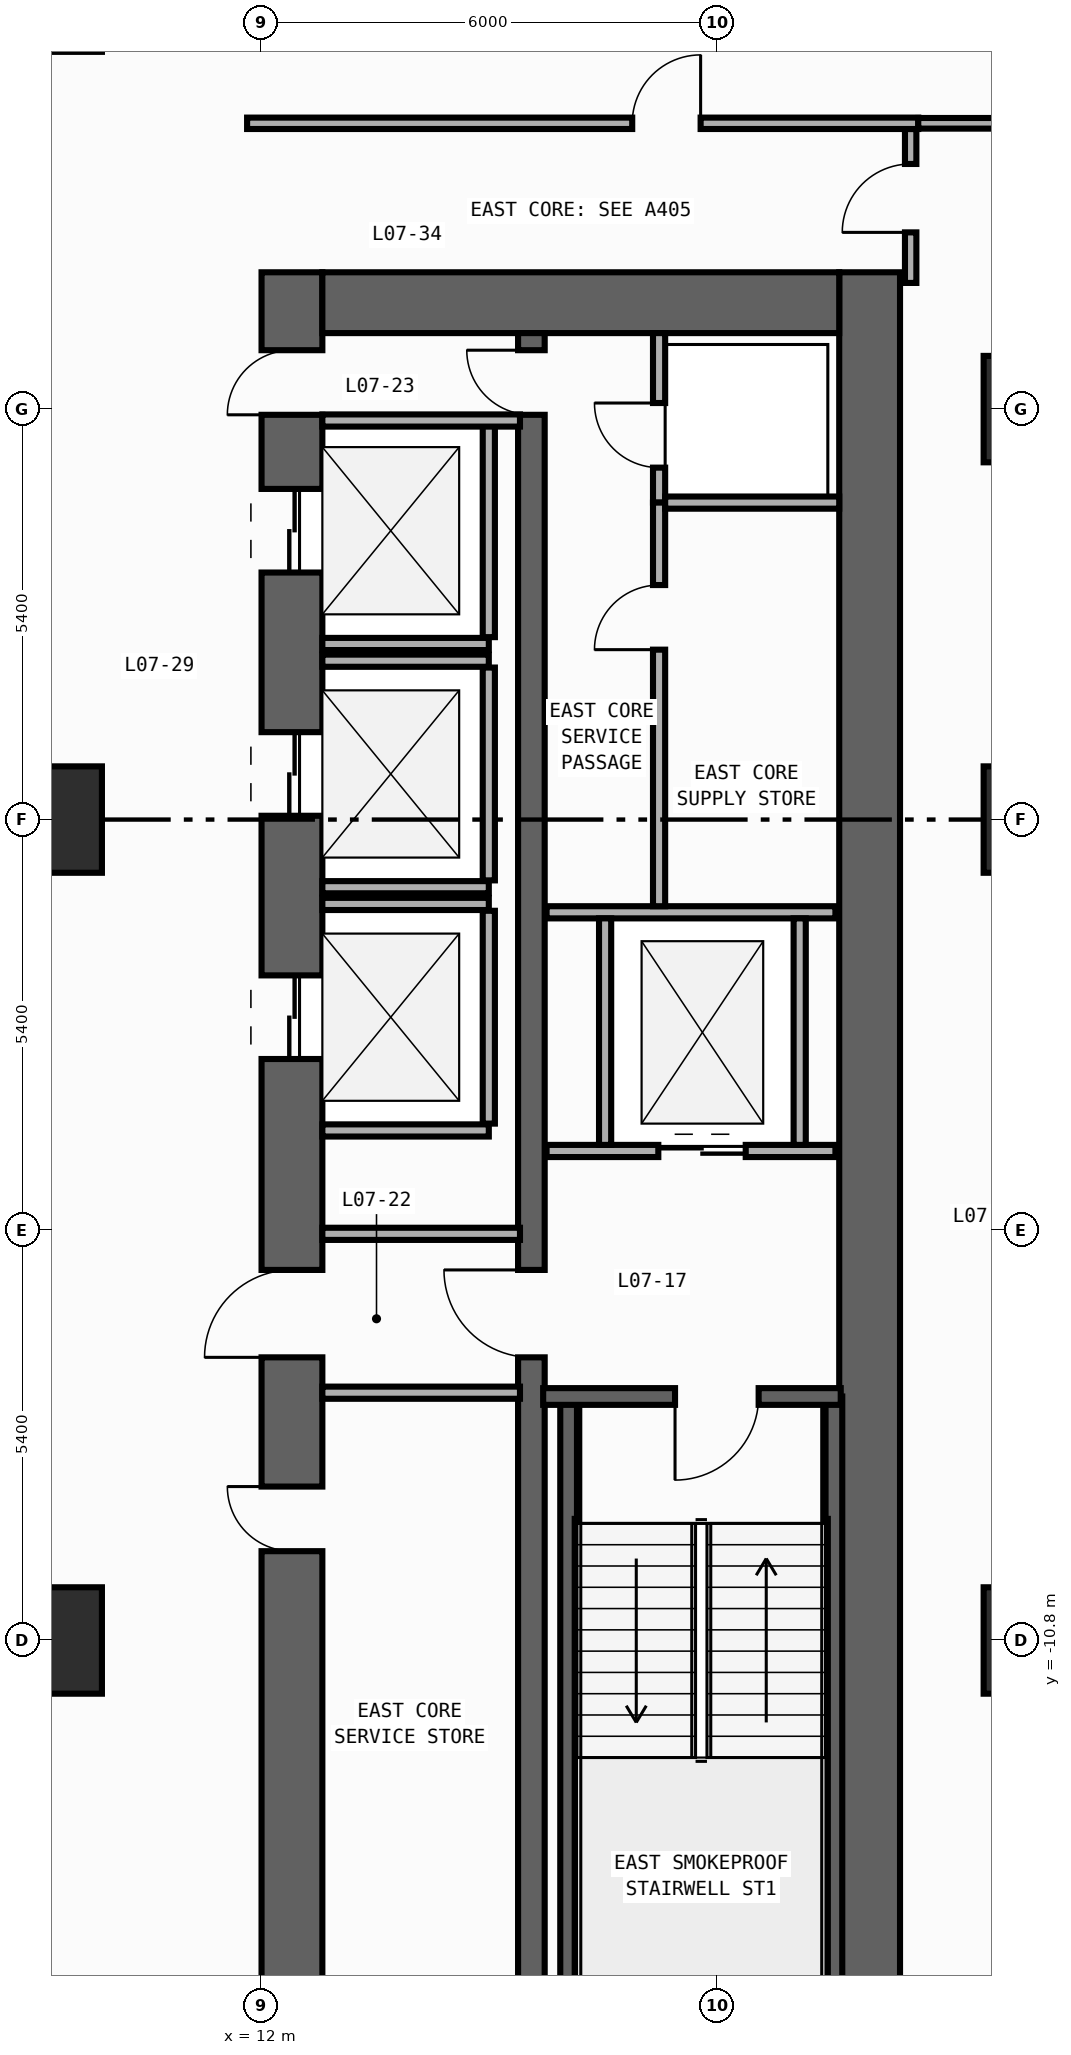
"""IFC4 building model, lengths in metres.
Left out: names, types, materials, properties, quantities, classifications, styles, units other than length and angle.
Written with IfcOpenShell. Run it as: python <this file> out.ifc"""

import sys

from ifc_helpers import new_model, si_unit, direction, frame, frame_2d, origin, origin_2d, place, context, subcontext, project, spatial, rectangle, extrude, element, fill, save


model = new_model("IFC4")
c1 = context("Model", 3, precision=1e-05, world=origin(), true_north=direction((0.0, 1.0)))
c2 = subcontext(c1, "Body", "Model", "MODEL_VIEW")
j1 = project(units=[si_unit("LENGTHUNIT", "METRE"), si_unit("PLANEANGLEUNIT", "RADIAN")], contexts=[c1])
p1 = place(None, origin())
s1 = spatial("IfcSite", under=j1, at=p1, CompositionType="ELEMENT")
p2 = place(p1, origin())
s2 = spatial("IfcBuilding", under=s1, at=p2, CompositionType="ELEMENT")
p3 = place(p2, frame((0.0, 0.0, 30.2)))
s3 = spatial("IfcBuildingStorey", under=s2, at=p3, CompositionType="ELEMENT", Elevation=30.2)
p4 = place(p3, frame((12.4, -19.8, 0.0), z_axis=(0.0, 0.0, 1.0), x_axis=(0.0, 1.0, 0.0)))
e1 = element("IfcWall", 1, at=p4, inside=s3, PredefinedType="SHEAR", context=c2, shape_type="SweptSolid", body=[
    extrude(rectangle(XDim=27.0, YDim=0.8, at=frame_2d((13.5, 0.0))), origin(), (0.0, 0.0, 1.0), 3.94),
])
p5 = place(p4, frame((23.05, 0.0, 0.0)))
e2 = element("IfcOpeningElement", 2, at=p5, cuts=e1, PredefinedType="OPENING", context=c2, shape_type="SweptSolid", body=[
    extrude(rectangle(XDim=1.1, YDim=2.2, at=frame_2d((0.55, 1.1))), frame((0.0, 0.41, 0.0), z_axis=(0.0, -1.0, 0.0), x_axis=(1.0, 0.0, 0.0)), (0.0, 0.0, 1.0), 0.82),
])
p6 = place(p4, frame((19.85, 0.0, 0.0)))
e3 = element("IfcOpeningElement", 3, at=p6, cuts=e1, PredefinedType="OPENING", context=c2, shape_type="SweptSolid", body=[
    extrude(rectangle(XDim=1.1, YDim=2.2, at=frame_2d((0.55, 1.1))), frame((0.0, 0.41, 0.0), z_axis=(0.0, -1.0, 0.0), x_axis=(1.0, 0.0, 0.0)), (0.0, 0.0, 1.0), 0.82),
])
p7 = place(p4, frame((16.65, 0.0, 0.0)))
e4 = element("IfcOpeningElement", 4, at=p7, cuts=e1, PredefinedType="OPENING", context=c2, shape_type="SweptSolid", body=[
    extrude(rectangle(XDim=1.1, YDim=2.2, at=frame_2d((0.55, 1.1))), frame((0.0, 0.41, 0.0), z_axis=(0.0, -1.0, 0.0), x_axis=(1.0, 0.0, 0.0)), (0.0, 0.0, 1.0), 0.82),
])
p8 = place(p4, frame((10.175, 0.0, 0.0)))
e5 = element("IfcOpeningElement", 5, at=p8, cuts=e1, PredefinedType="OPENING", context=c2, shape_type="SweptSolid", body=[
    extrude(rectangle(XDim=0.85, YDim=2.1, at=frame_2d((0.425, 1.05))), frame((0.0, 0.41, 0.0), z_axis=(0.0, -1.0, 0.0), x_axis=(1.0, 0.0, 0.0)), (0.0, 0.0, 1.0), 0.82),
])
p9 = place(p4, frame((12.725, 0.0, 0.0)))
e6 = element("IfcOpeningElement", 6, at=p9, cuts=e1, PredefinedType="OPENING", context=c2, shape_type="SweptSolid", body=[
    extrude(rectangle(XDim=1.15, YDim=2.2, at=frame_2d((0.575, 1.1))), frame((0.0, 0.41, 0.0), z_axis=(0.0, -1.0, 0.0), x_axis=(1.0, 0.0, 0.0)), (0.0, 0.0, 1.0), 0.82),
])
p10 = place(p4, frame((25.125, 0.0, 0.0)))
e7 = element("IfcOpeningElement", 7, at=p10, cuts=e1, PredefinedType="OPENING", context=c2, shape_type="SweptSolid", body=[
    extrude(rectangle(XDim=0.85, YDim=2.1, at=frame_2d((0.425, 1.05))), frame((0.0, 0.41, 0.0), z_axis=(0.0, -1.0, 0.0), x_axis=(1.0, 0.0, 0.0)), (0.0, 0.0, 1.0), 0.82),
])
p11 = place(p3, frame((20.0, -19.8, 0.0), z_axis=(0.0, 0.0, 1.0), x_axis=(0.0, 1.0, 0.0)))
e8 = element("IfcWall", 8, at=p11, inside=s3, PredefinedType="SHEAR", context=c2, shape_type="SweptSolid", body=[
    extrude(rectangle(XDim=27.0, YDim=0.8, at=frame_2d((13.5, 0.0))), origin(), (0.0, 0.0, 1.0), 3.94),
])
p12 = place(p3, frame((12.8, 6.8, 0.0), z_axis=(0.0, 0.0, 1.0), x_axis=(1.0, 0.0, 0.0)))
e9 = element("IfcWall", 9, at=p12, inside=s3, PredefinedType="SHEAR", context=c2, shape_type="SweptSolid", body=[
    extrude(rectangle(XDim=6.8, YDim=0.8, at=frame_2d((3.4, 0.0))), origin(), (0.0, 0.0, 1.0), 3.94),
])
p13 = place(p3, frame((15.55, -19.0, 0.0), z_axis=(0.0, 0.0, 1.0), x_axis=(0.0, 1.0, 0.0)))
e10 = element("IfcWall", 10, at=p13, inside=s3, PredefinedType="SHEAR", context=c2, shape_type="SweptSolid", body=[
    extrude(rectangle(XDim=25.4, YDim=0.35, at=frame_2d((12.7, 0.0))), origin(), (0.0, 0.0, 1.0), 3.94),
])
p14 = place(p13, frame((11.925, 0.0, 0.0)))
e11 = element("IfcOpeningElement", 11, at=p14, cuts=e10, PredefinedType="OPENING", context=c2, shape_type="SweptSolid", body=[
    extrude(rectangle(XDim=1.15, YDim=2.2, at=frame_2d((0.575, 1.1))), frame((0.0, 0.185, 0.0), z_axis=(0.0, -1.0, 0.0), x_axis=(1.0, 0.0, 0.0)), (0.0, 0.0, 1.0), 0.37),
])
p15 = place(p13, frame((24.325, 0.0, 0.0)))
e12 = element("IfcOpeningElement", 12, at=p15, cuts=e10, PredefinedType="OPENING", context=c2, shape_type="SweptSolid", body=[
    extrude(rectangle(XDim=0.85, YDim=2.1, at=frame_2d((0.425, 1.05))), frame((0.0, 0.185, 0.0), z_axis=(0.0, -1.0, 0.0), x_axis=(1.0, 0.0, 0.0)), (0.0, 0.0, 1.0), 0.37),
])
for number, where, z_axis, x_axis in (
    (13, (16.04, -18.89, 0.0), (0.0, 0.0, 1.0), (0.0, 1.0, 0.0)),
    (14, (19.53, -18.89, 0.0), (0.0, 0.0, 1.0), (0.0, 1.0, 0.0)),
):
    element("IfcWall", number, at=place(p3, frame(where, z_axis=z_axis, x_axis=x_axis)), inside=s3, PredefinedType="SHEAR", context=c2, shape_type="SweptSolid", body=[
        extrude(rectangle(XDim=11.3, YDim=0.22, at=frame_2d((5.65, 0.0))), origin(), (0.0, 0.0, 1.0), 3.94),
    ])
p16 = place(p3, frame((19.62, -7.59, 0.0), z_axis=(0.0, 0.0, 1.0), x_axis=(-1.0, 0.0, 0.0)))
e15 = element("IfcWall", 15, at=p16, inside=s3, PredefinedType="SHEAR", context=c2, shape_type="SweptSolid", body=[
    extrude(rectangle(XDim=3.915, YDim=0.22, at=frame_2d((1.958, 0.0))), origin(), (0.0, 0.0, 1.0), 3.94),
])
p17 = place(p16, frame((1.08, 0.0, 0.0)))
e16 = element("IfcOpeningElement", 16, at=p17, cuts=e15, PredefinedType="OPENING", context=c2, shape_type="SweptSolid", body=[
    extrude(rectangle(XDim=1.1, YDim=2.2, at=frame_2d((0.55, 1.1))), frame((0.0, 0.12, 0.0), z_axis=(0.0, -1.0, 0.0), x_axis=(1.0, 0.0, 0.0)), (0.0, 0.0, 1.0), 0.24),
])
for number, where, z_axis, x_axis in (
    (17, (9.2, -10.8, 0.0), (0.0, 0.0, 1.0), (1.0, 0.0, 0.0)),
    (18, (9.2, 0.0, 0.0), (0.0, 0.0, 1.0), (1.0, 0.0, 0.0)),
    (19, (22.2, -10.8, 0.0), (0.0, 0.0, 1.0), (1.0, 0.0, 0.0)),
    (20, (22.2, 0.0, 0.0), (0.0, 0.0, 1.0), (1.0, 0.0, 0.0)),
    (21, (22.2, 5.4, 0.0), (0.0, 0.0, 1.0), (1.0, 0.0, 0.0)),
):
    element("IfcColumn", number, at=place(p3, frame(where, z_axis=z_axis, x_axis=x_axis)), inside=s3, PredefinedType="COLUMN", context=c2, shape_type="SweptSolid", body=[
        extrude(rectangle(XDim=1.4, YDim=1.4, at=origin_2d()), origin(), (0.0, 0.0, 1.0), 4.2),
    ])
p18 = place(p3, frame((12.8, 2.31, 0.0), z_axis=(0.0, 0.0, 1.0), x_axis=(1.0, 0.0, 0.0)))
e22 = element("IfcWall", 22, at=p18, inside=s3, PredefinedType="STANDARD", context=c2, shape_type="SweptSolid", body=[
    extrude(rectangle(XDim=2.19, YDim=0.16, at=frame_2d((1.095, 0.0))), origin(), (0.0, 0.0, 1.0), 3.94),
])
p19 = place(p3, frame((14.99, 2.4, 0.0), z_axis=(0.0, 0.0, 1.0), x_axis=(0.0, 1.0, 0.0)))
e23 = element("IfcWall", 23, at=p19, inside=s3, PredefinedType="STANDARD", context=c2, shape_type="SweptSolid", body=[
    extrude(rectangle(XDim=2.8, YDim=0.16, at=frame_2d((1.4, 0.0))), origin(), (0.0, 0.0, 1.0), 3.94),
])
for number, where, z_axis, x_axis in (
    (24, (12.8, -0.89, 0.0), (0.0, 0.0, 1.0), (1.0, 0.0, 0.0)),
    (25, (12.8, 2.09, 0.0), (0.0, 0.0, 1.0), (1.0, 0.0, 0.0)),
):
    element("IfcWall", number, at=place(p3, frame(where, z_axis=z_axis, x_axis=x_axis)), inside=s3, PredefinedType="STANDARD", context=c2, shape_type="SweptSolid", body=[
        extrude(rectangle(XDim=2.19, YDim=0.16, at=frame_2d((1.095, 0.0))), origin(), (0.0, 0.0, 1.0), 3.94),
    ])
p20 = place(p3, frame((14.99, -0.8, 0.0), z_axis=(0.0, 0.0, 1.0), x_axis=(0.0, 1.0, 0.0)))
e26 = element("IfcWall", 26, at=p20, inside=s3, PredefinedType="STANDARD", context=c2, shape_type="SweptSolid", body=[
    extrude(rectangle(XDim=2.8, YDim=0.16, at=frame_2d((1.4, 0.0))), origin(), (0.0, 0.0, 1.0), 3.94),
])
for number, where, z_axis, x_axis in (
    (27, (12.8, -4.09, 0.0), (0.0, 0.0, 1.0), (1.0, 0.0, 0.0)),
    (28, (12.8, -1.11, 0.0), (0.0, 0.0, 1.0), (1.0, 0.0, 0.0)),
):
    element("IfcWall", number, at=place(p3, frame(where, z_axis=z_axis, x_axis=x_axis)), inside=s3, PredefinedType="STANDARD", context=c2, shape_type="SweptSolid", body=[
        extrude(rectangle(XDim=2.19, YDim=0.16, at=frame_2d((1.095, 0.0))), origin(), (0.0, 0.0, 1.0), 3.94),
    ])
p21 = place(p3, frame((14.99, -4.0, 0.0), z_axis=(0.0, 0.0, 1.0), x_axis=(0.0, 1.0, 0.0)))
e29 = element("IfcWall", 29, at=p21, inside=s3, PredefinedType="STANDARD", context=c2, shape_type="SweptSolid", body=[
    extrude(rectangle(XDim=2.8, YDim=0.16, at=frame_2d((1.4, 0.0))), origin(), (0.0, 0.0, 1.0), 3.94),
])
p22 = place(p3, frame((15.75, -4.36, 0.0), z_axis=(0.0, 0.0, 1.0), x_axis=(1.0, 0.0, 0.0)))
e30 = element("IfcWall", 30, at=p22, inside=s3, PredefinedType="STANDARD", context=c2, shape_type="SweptSolid", body=[
    extrude(rectangle(XDim=3.8, YDim=0.16, at=frame_2d((1.9, 0.0))), origin(), (0.0, 0.0, 1.0), 3.94),
])
p23 = place(p22, frame((1.47, 0.0, 0.0)))
e31 = element("IfcOpeningElement", 31, at=p23, cuts=e30, PredefinedType="OPENING", context=c2, shape_type="SweptSolid", body=[
    extrude(rectangle(XDim=1.15, YDim=2.2, at=frame_2d((0.575, 1.1))), frame((0.0, 0.09, 0.0), z_axis=(0.0, -1.0, 0.0), x_axis=(1.0, 0.0, 0.0)), (0.0, 0.0, 1.0), 0.18),
])
p24 = place(p3, frame((15.75, -1.22, 0.0), z_axis=(0.0, 0.0, 1.0), x_axis=(1.0, 0.0, 0.0)))
e32 = element("IfcWall", 32, at=p24, inside=s3, PredefinedType="STANDARD", context=c2, shape_type="SweptSolid", body=[
    extrude(rectangle(XDim=3.8, YDim=0.16, at=frame_2d((1.9, 0.0))), origin(), (0.0, 0.0, 1.0), 3.94),
])
for number, where, z_axis, x_axis in (
    (33, (16.52, -4.28, 0.0), (0.0, 0.0, 1.0), (0.0, 1.0, 0.0)),
    (34, (19.08, -4.28, 0.0), (0.0, 0.0, 1.0), (0.0, 1.0, 0.0)),
):
    element("IfcWall", number, at=place(p3, frame(where, z_axis=z_axis, x_axis=x_axis)), inside=s3, PredefinedType="STANDARD", context=c2, shape_type="SweptSolid", body=[
        extrude(rectangle(XDim=2.98, YDim=0.16, at=frame_2d((1.49, 0.0))), origin(), (0.0, 0.0, 1.0), 3.94),
    ])
for number, where, z_axis, x_axis in (
    (35, (12.8, -5.45, 0.0), (0.0, 0.0, 1.0), (1.0, 0.0, 0.0)),
    (36, (12.8, -7.54, 0.0), (0.0, 0.0, 1.0), (1.0, 0.0, 0.0)),
    (37, (12.8, 5.25, 0.0), (0.0, 0.0, 1.0), (1.0, 0.0, 0.0)),
):
    element("IfcWall", number, at=place(p3, frame(where, z_axis=z_axis, x_axis=x_axis)), inside=s3, PredefinedType="STANDARD", context=c2, shape_type="SweptSolid", body=[
        extrude(rectangle(XDim=2.6, YDim=0.16, at=frame_2d((1.3, 0.0))), origin(), (0.0, 0.0, 1.0), 3.94),
    ])
p25 = place(p3, frame((17.23, 4.17, 0.0), z_axis=(0.0, 0.0, 1.0), x_axis=(0.0, 1.0, 0.0)))
e38 = element("IfcWall", 38, at=p25, inside=s3, PredefinedType="PARTITIONING", context=c2, shape_type="SweptSolid", body=[
    extrude(rectangle(XDim=2.23, YDim=0.16, at=frame_2d((1.115, 0.0))), origin(), (0.0, 0.0, 1.0), 3.94),
])
p26 = place(p25, frame((0.46, 0.0, 0.0)))
e39 = element("IfcOpeningElement", 39, at=p26, cuts=e38, PredefinedType="OPENING", context=c2, shape_type="SweptSolid", body=[
    extrude(rectangle(XDim=0.85, YDim=2.1, at=frame_2d((0.425, 1.05))), frame((0.0, 0.09, 0.0), z_axis=(0.0, -1.0, 0.0), x_axis=(1.0, 0.0, 0.0)), (0.0, 0.0, 1.0), 0.18),
])
p27 = place(p3, frame((17.23, -1.14, 0.0), z_axis=(0.0, 0.0, 1.0), x_axis=(0.0, 1.0, 0.0)))
e40 = element("IfcWall", 40, at=p27, inside=s3, PredefinedType="PARTITIONING", context=c2, shape_type="SweptSolid", body=[
    extrude(rectangle(XDim=5.31, YDim=0.16, at=frame_2d((2.655, 0.0))), origin(), (0.0, 0.0, 1.0), 3.94),
])
p28 = place(p27, frame((3.375, 0.0, 0.0)))
e41 = element("IfcOpeningElement", 41, at=p28, cuts=e40, PredefinedType="OPENING", context=c2, shape_type="SweptSolid", body=[
    extrude(rectangle(XDim=0.85, YDim=2.1, at=frame_2d((0.425, 1.05))), frame((0.0, 0.09, 0.0), z_axis=(0.0, -1.0, 0.0), x_axis=(1.0, 0.0, 0.0)), (0.0, 0.0, 1.0), 0.18),
])
p29 = place(p3, frame((17.31, 4.17, 0.0), z_axis=(0.0, 0.0, 1.0), x_axis=(1.0, 0.0, 0.0)))
e42 = element("IfcWall", 42, at=p29, inside=s3, PredefinedType="PARTITIONING", context=c2, shape_type="SweptSolid", body=[
    extrude(rectangle(XDim=2.29, YDim=0.16, at=frame_2d((1.145, 0.0))), origin(), (0.0, 0.0, 1.0), 3.94),
])
p30 = place(p3, frame((20.54, 7.06, 0.0), z_axis=(0.0, 0.0, 1.0), x_axis=(0.0, 1.0, 0.0)))
e43 = element("IfcWall", 43, at=p30, inside=s3, PredefinedType="PARTITIONING", context=c2, shape_type="SweptSolid", body=[
    extrude(rectangle(XDim=2.025, YDim=0.15, at=frame_2d((1.012, 0.0))), origin(), (0.0, 0.0, 1.0), 3.94),
])
p31 = place(p30, frame((0.665, 0.0, 0.0)))
e44 = element("IfcOpeningElement", 44, at=p31, cuts=e43, PredefinedType="OPENING", context=c2, shape_type="SweptSolid", body=[
    extrude(rectangle(XDim=0.9, YDim=2.15, at=frame_2d((0.45, 1.075))), frame((0.0, 0.085, 0.0), z_axis=(0.0, -1.0, 0.0), x_axis=(1.0, 0.0, 0.0)), (0.0, 0.0, 1.0), 0.17),
])
p32 = place(p3, frame((11.81, 9.16, 0.0), z_axis=(0.0, 0.0, 1.0), x_axis=(1.0, 0.0, 0.0)))
e45 = element("IfcWall", 45, at=p32, inside=s3, PredefinedType="PARTITIONING", context=c2, shape_type="SweptSolid", body=[
    extrude(rectangle(XDim=8.83, YDim=0.15, at=frame_2d((4.415, 0.0))), origin(), (0.0, 0.0, 1.0), 3.94),
])
p33 = place(p32, frame((5.067, 0.0, 0.0)))
e46 = element("IfcOpeningElement", 46, at=p33, cuts=e45, PredefinedType="OPENING", context=c2, shape_type="SweptSolid", body=[
    extrude(rectangle(XDim=0.9, YDim=2.15, at=frame_2d((0.45, 1.075))), frame((0.0, 0.085, 0.0), z_axis=(0.0, -1.0, 0.0), x_axis=(1.0, 0.0, 0.0)), (0.0, 0.0, 1.0), 0.17),
])
p34 = place(p3, frame((20.64, 9.16, 0.0), z_axis=(0.0, 0.0, 1.0), x_axis=(1.0, 0.0, 0.0)))
e47 = element("IfcWall", 47, at=p34, inside=s3, PredefinedType="PARTITIONING", context=c2, shape_type="SweptSolid", body=[
    extrude(rectangle(XDim=3.415, YDim=0.14, at=frame_2d((1.708, 0.0))), origin(), (0.0, 0.0, 1.0), 3.94),
])
p35 = place(p17, origin())
e48 = element("IfcDoor", 48, at=p35, inside=s3, OperationType="SINGLE_SWING_RIGHT", PredefinedType="DOOR", context=c2, shape_type="SweptSolid", body=[
    extrude(rectangle(XDim=1.1, YDim=2.2, at=frame_2d((0.55, 1.1))), frame((0.0, 0.025, 0.0), z_axis=(0.0, -1.0, 0.0), x_axis=(1.0, 0.0, 0.0)), (0.0, 0.0, 1.0), 0.05),
])
fill(e16, e48)
p36 = place(p5, origin())
e49 = element("IfcDoor", 49, at=p36, inside=s3, OperationType="DOUBLE_DOOR_SLIDING", PredefinedType="DOOR", context=c2, shape_type="SweptSolid", body=[
    extrude(rectangle(XDim=1.1, YDim=2.2, at=frame_2d((0.55, 1.1))), frame((0.0, 0.025, 0.0), z_axis=(0.0, -1.0, 0.0), x_axis=(1.0, 0.0, 0.0)), (0.0, 0.0, 1.0), 0.05),
])
fill(e2, e49)
p37 = place(p6, origin())
e50 = element("IfcDoor", 50, at=p37, inside=s3, OperationType="DOUBLE_DOOR_SLIDING", PredefinedType="DOOR", context=c2, shape_type="SweptSolid", body=[
    extrude(rectangle(XDim=1.1, YDim=2.2, at=frame_2d((0.55, 1.1))), frame((0.0, 0.025, 0.0), z_axis=(0.0, -1.0, 0.0), x_axis=(1.0, 0.0, 0.0)), (0.0, 0.0, 1.0), 0.05),
])
fill(e3, e50)
p38 = place(p7, origin())
e51 = element("IfcDoor", 51, at=p38, inside=s3, OperationType="DOUBLE_DOOR_SLIDING", PredefinedType="DOOR", context=c2, shape_type="SweptSolid", body=[
    extrude(rectangle(XDim=1.1, YDim=2.2, at=frame_2d((0.55, 1.1))), frame((0.0, 0.025, 0.0), z_axis=(0.0, -1.0, 0.0), x_axis=(1.0, 0.0, 0.0)), (0.0, 0.0, 1.0), 0.05),
])
fill(e4, e51)
p39 = place(p8, origin())
e52 = element("IfcDoor", 52, at=p39, inside=s3, OperationType="SINGLE_SWING_RIGHT", PredefinedType="DOOR", context=c2, shape_type="SweptSolid", body=[
    extrude(rectangle(XDim=0.85, YDim=2.1, at=frame_2d((0.425, 1.05))), frame((0.0, 0.025, 0.0), z_axis=(0.0, -1.0, 0.0), x_axis=(1.0, 0.0, 0.0)), (0.0, 0.0, 1.0), 0.05),
])
fill(e5, e52)
p40 = place(p9, origin())
e53 = element("IfcDoor", 53, at=p40, inside=s3, OperationType="SINGLE_SWING_LEFT", PredefinedType="DOOR", context=c2, shape_type="SweptSolid", body=[
    extrude(rectangle(XDim=1.15, YDim=2.2, at=frame_2d((0.575, 1.1))), frame((0.0, 0.025, 0.0), z_axis=(0.0, -1.0, 0.0), x_axis=(1.0, 0.0, 0.0)), (0.0, 0.0, 1.0), 0.05),
])
fill(e6, e53)
p41 = place(p14, origin())
e54 = element("IfcDoor", 54, at=p41, inside=s3, OperationType="SINGLE_SWING_RIGHT", PredefinedType="DOOR", context=c2, shape_type="SweptSolid", body=[
    extrude(rectangle(XDim=1.15, YDim=2.2, at=frame_2d((0.575, 1.1))), frame((0.0, 0.025, 0.0), z_axis=(0.0, -1.0, 0.0), x_axis=(1.0, 0.0, 0.0)), (0.0, 0.0, 1.0), 0.05),
])
fill(e11, e54)
p42 = place(p10, origin())
e55 = element("IfcDoor", 55, at=p42, inside=s3, OperationType="SINGLE_SWING_LEFT", PredefinedType="DOOR", context=c2, shape_type="SweptSolid", body=[
    extrude(rectangle(XDim=0.85, YDim=2.1, at=frame_2d((0.425, 1.05))), frame((0.0, 0.025, 0.0), z_axis=(0.0, -1.0, 0.0), x_axis=(1.0, 0.0, 0.0)), (0.0, 0.0, 1.0), 0.05),
])
fill(e7, e55)
p43 = place(p15, origin())
e56 = element("IfcDoor", 56, at=p43, inside=s3, OperationType="SINGLE_SWING_RIGHT", PredefinedType="DOOR", context=c2, shape_type="SweptSolid", body=[
    extrude(rectangle(XDim=0.85, YDim=2.1, at=frame_2d((0.425, 1.05))), frame((0.0, 0.025, 0.0), z_axis=(0.0, -1.0, 0.0), x_axis=(1.0, 0.0, 0.0)), (0.0, 0.0, 1.0), 0.05),
])
fill(e12, e56)
p44 = place(p23, origin())
e57 = element("IfcDoor", 57, at=p44, inside=s3, OperationType="DOUBLE_DOOR_SLIDING", PredefinedType="DOOR", context=c2, shape_type="SweptSolid", body=[
    extrude(rectangle(XDim=1.15, YDim=2.2, at=frame_2d((0.575, 1.1))), frame((0.0, 0.025, 0.0), z_axis=(0.0, -1.0, 0.0), x_axis=(1.0, 0.0, 0.0)), (0.0, 0.0, 1.0), 0.05),
])
fill(e31, e57)
p45 = place(p26, origin())
e58 = element("IfcDoor", 58, at=p45, inside=s3, OperationType="SINGLE_SWING_RIGHT", PredefinedType="DOOR", context=c2, shape_type="SweptSolid", body=[
    extrude(rectangle(XDim=0.85, YDim=2.1, at=frame_2d((0.425, 1.05))), frame((0.0, 0.025, 0.0), z_axis=(0.0, -1.0, 0.0), x_axis=(1.0, 0.0, 0.0)), (0.0, 0.0, 1.0), 0.05),
])
fill(e39, e58)
p46 = place(p28, origin())
e59 = element("IfcDoor", 59, at=p46, inside=s3, OperationType="SINGLE_SWING_LEFT", PredefinedType="DOOR", context=c2, shape_type="SweptSolid", body=[
    extrude(rectangle(XDim=0.85, YDim=2.1, at=frame_2d((0.425, 1.05))), frame((0.0, 0.025, 0.0), z_axis=(0.0, -1.0, 0.0), x_axis=(1.0, 0.0, 0.0)), (0.0, 0.0, 1.0), 0.05),
])
fill(e41, e59)
p47 = place(p31, origin())
e60 = element("IfcDoor", 60, at=p47, inside=s3, OperationType="SINGLE_SWING_LEFT", PredefinedType="DOOR", context=c2, shape_type="SweptSolid", body=[
    extrude(rectangle(XDim=0.9, YDim=2.15, at=frame_2d((0.45, 1.075))), frame((0.0, 0.025, 0.0), z_axis=(0.0, -1.0, 0.0), x_axis=(1.0, 0.0, 0.0)), (0.0, 0.0, 1.0), 0.05),
])
fill(e44, e60)
p48 = place(p33, origin())
e61 = element("IfcDoor", 61, at=p48, inside=s3, OperationType="SINGLE_SWING_RIGHT", PredefinedType="DOOR", context=c2, shape_type="SweptSolid", body=[
    extrude(rectangle(XDim=0.9, YDim=2.15, at=frame_2d((0.45, 1.075))), frame((0.0, 0.025, 0.0), z_axis=(0.0, -1.0, 0.0), x_axis=(1.0, 0.0, 0.0)), (0.0, 0.0, 1.0), 0.05),
])
fill(e46, e61)
save(model, sys.argv[1])
